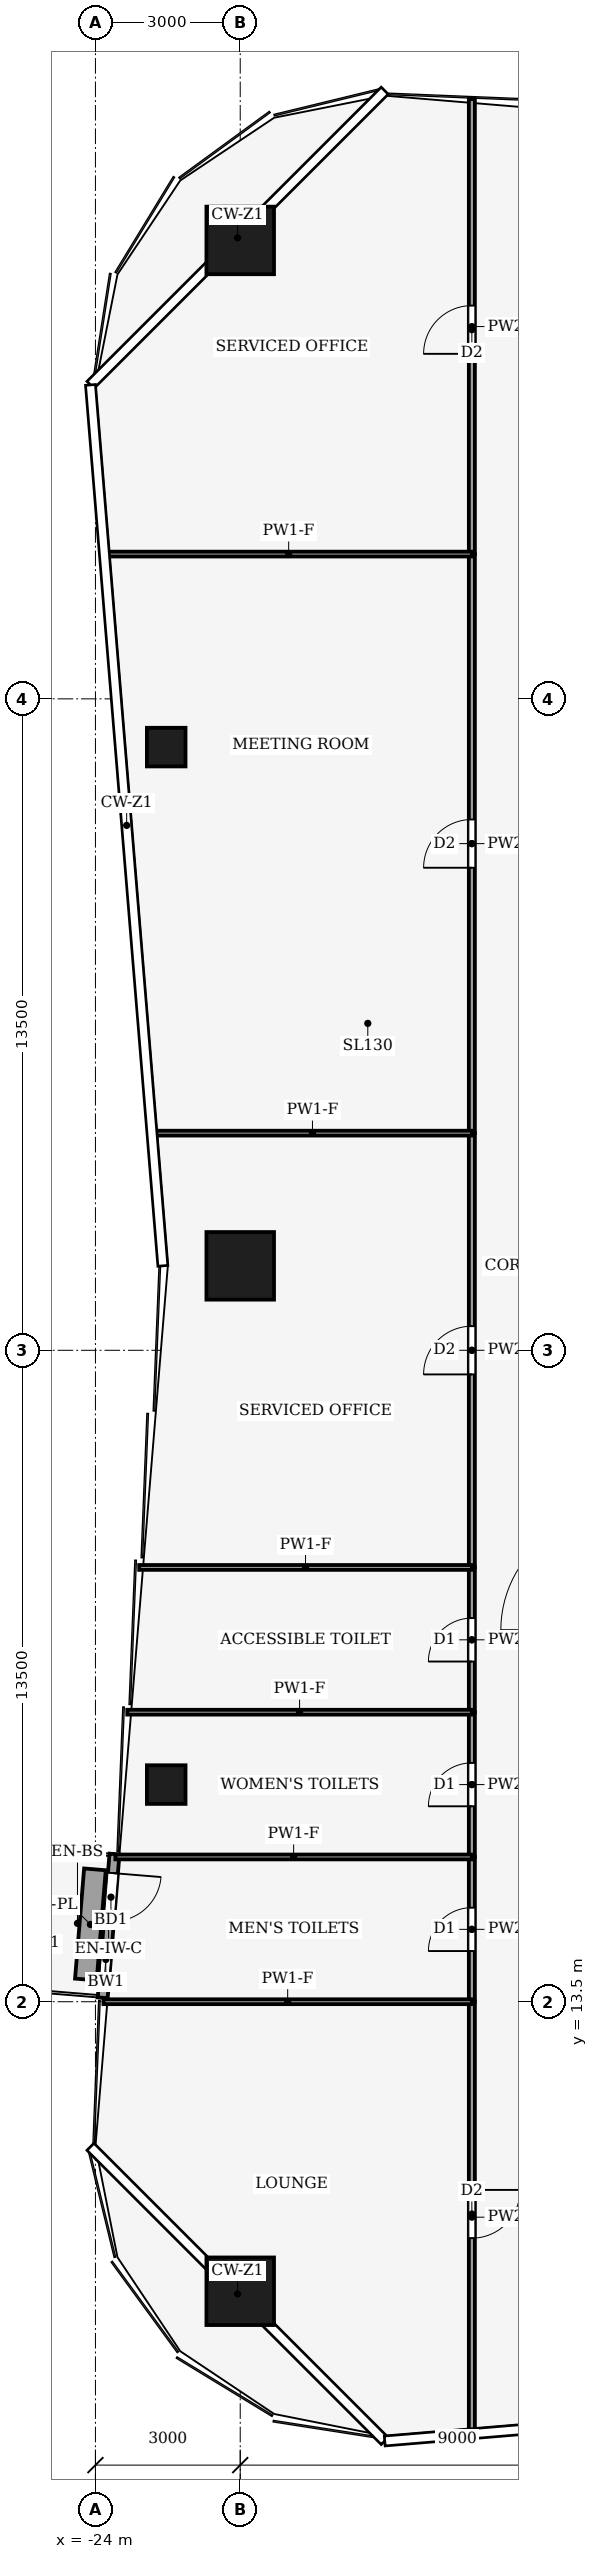
"""IFC4 building model, lengths in metres.
Left out: names, types, materials, properties, quantities, classifications, styles, units other than length and angle.
Written with IfcOpenShell. Run it as: python <this file> out.ifc"""

import sys

from ifc_helpers import new_model, si_unit, direction, frame, frame_2d, origin, origin_2d, place, context, subcontext, project, spatial, rectangle, hollow_rectangle, extrude, element, fill, save


model = new_model("IFC4")
c1 = context("Model", 3, precision=1e-05, world=origin(), true_north=direction((0.0, 1.0)))
c2 = subcontext(c1, "Body", "Model", "MODEL_VIEW")
j1 = project(units=[si_unit("LENGTHUNIT", "METRE"), si_unit("PLANEANGLEUNIT", "RADIAN")], contexts=[c1])
p1 = place(None, origin())
s1 = spatial("IfcSite", under=j1, at=p1, CompositionType="ELEMENT")
p2 = place(p1, origin())
s2 = spatial("IfcBuilding", under=s1, at=p2, CompositionType="ELEMENT")
p3 = place(p2, frame((0.0, 0.0, 102.0)))
s3 = spatial("IfcBuildingStorey", under=s2, at=p3, CompositionType="ELEMENT", Elevation=102.0)
for number, where, z_axis, x_axis in (
    (1, (-21.0, 50.0, 0.0), (0.0, 0.0, 1.0), (1.0, 0.0, 0.0)),
    (2, (-21.0, 7.5, 0.0), (0.0, 0.0, 1.0), (1.0, 0.0, 0.0)),
    (3, (-21.0, 28.75, 0.0), (0.0, 0.0, 1.0), (1.0, 0.0, 0.0)),
):
    element("IfcColumn", number, at=place(p3, frame(where, z_axis=z_axis, x_axis=x_axis)), inside=s3, PredefinedType="COLUMN", context=c2, shape_type="SweptSolid", body=[
        extrude(hollow_rectangle(XDim=1.4, YDim=1.4, WallThickness=0.08, at=origin_2d()), origin(), (0.0, 0.0, 1.0), 4.0),
    ])
for number, where, z_axis, x_axis in (
    (4, (-22.534, 18.0, 0.0), (0.0, 0.0, 1.0), (1.0, 0.0, 0.0)),
    (5, (-22.534, 39.5, 0.0), (0.0, 0.0, 1.0), (1.0, 0.0, 0.0)),
):
    element("IfcColumn", number, at=place(p3, frame(where, z_axis=z_axis, x_axis=x_axis)), inside=s3, PredefinedType="COLUMN", context=c2, shape_type="SweptSolid", body=[
        extrude(hollow_rectangle(XDim=0.8, YDim=0.8, WallThickness=0.04, at=origin_2d()), origin(), (0.0, 0.0, 1.0), 4.0),
    ])
p4 = place(p3, frame((-23.605, 16.561, 0.0), z_axis=(0.0, 0.0, 1.0), x_axis=(-0.081903334605, -0.996640278024, 0.0)))
e6 = element("IfcWall", 6, at=p4, inside=s3, PredefinedType="SOLIDWALL", context=c2, shape_type="SweptSolid", body=[
    extrude(rectangle(XDim=2.99, YDim=0.206, at=frame_2d((1.495, 0.0))), origin(), (0.0, 0.0, 1.0), 3.65),
])
p5 = place(p4, frame((0.396, 0.0, 0.0)))
e7 = element("IfcOpeningElement", 7, at=p5, cuts=e6, PredefinedType="OPENING", context=c2, shape_type="SweptSolid", body=[
    extrude(rectangle(XDim=1.0, YDim=2.1, at=frame_2d((0.5, 1.05))), frame((0.0, 0.113, 0.0), z_axis=(0.0, -1.0, 0.0), x_axis=(1.0, 0.0, 0.0)), (0.0, 0.0, 1.0), 0.226),
])
p6 = place(p4, frame((1.793, 0.0, 0.9)))
e8 = element("IfcOpeningElement", 8, at=p6, cuts=e6, PredefinedType="OPENING", context=c2, shape_type="SweptSolid", body=[
    extrude(rectangle(XDim=0.8, YDim=1.2, at=frame_2d((0.4, 0.6))), frame((0.0, 0.113, 0.0), z_axis=(0.0, -1.0, 0.0), x_axis=(1.0, 0.0, 0.0)), (0.0, 0.0, 1.0), 0.226),
])
p7 = place(p3, frame((-24.01, 16.243, 0.0), z_axis=(0.0, 0.0, 1.0), x_axis=(-0.081986639556, -0.996633428566, 0.0)))
e9 = element("IfcWall", 9, at=p7, inside=s3, PredefinedType="USERDEFINED", context=c2, shape_type="SweptSolid", body=[
    extrude(rectangle(XDim=2.29, YDim=0.45, at=frame_2d((1.145, 0.0))), origin(), (0.0, 0.0, 1.0), 0.4),
])
p8 = place(p3, frame((-16.2, 13.5, 0.0), z_axis=(0.0, 0.0, 1.0), x_axis=(0.0, -1.0, 0.0)))
e10 = element("IfcWall", 10, at=p8, inside=s3, PredefinedType="PARTITIONING", context=c2, shape_type="SweptSolid", body=[
    extrude(rectangle(XDim=8.93, YDim=0.125, at=frame_2d((4.465, 0.0))), origin(), (0.0, 0.0, 1.0), 3.04),
])
p9 = place(p8, frame((3.9, 0.0, 0.0)))
e11 = element("IfcOpeningElement", 11, at=p9, cuts=e10, PredefinedType="OPENING", context=c2, shape_type="SweptSolid", body=[
    extrude(rectangle(XDim=1.0, YDim=2.1, at=frame_2d((0.5, 1.05))), frame((0.0, 0.073, 0.0), z_axis=(0.0, -1.0, 0.0), x_axis=(1.0, 0.0, 0.0)), (0.0, 0.0, 1.0), 0.145),
])
p10 = place(p3, frame((-16.2, 13.5, 0.0), z_axis=(0.0, 0.0, 1.0), x_axis=(0.0, 1.0, 0.0)))
e12 = element("IfcWall", 12, at=p10, inside=s3, PredefinedType="PARTITIONING", context=c2, shape_type="SweptSolid", body=[
    extrude(rectangle(XDim=3.0, YDim=0.125, at=frame_2d((1.5, 0.0))), origin(), (0.0, 0.0, 1.0), 3.87),
])
p11 = place(p10, frame((1.05, 0.0, 0.0)))
e13 = element("IfcOpeningElement", 13, at=p11, cuts=e12, PredefinedType="OPENING", context=c2, shape_type="SweptSolid", body=[
    extrude(rectangle(XDim=0.9, YDim=2.1, at=frame_2d((0.45, 1.05))), frame((0.0, 0.073, 0.0), z_axis=(0.0, -1.0, 0.0), x_axis=(1.0, 0.0, 0.0)), (0.0, 0.0, 1.0), 0.145),
])
p12 = place(p3, frame((-16.2, 16.5, 0.0), z_axis=(0.0, 0.0, 1.0), x_axis=(0.0, 1.0, 0.0)))
e14 = element("IfcWall", 14, at=p12, inside=s3, PredefinedType="PARTITIONING", context=c2, shape_type="SweptSolid", body=[
    extrude(rectangle(XDim=3.0, YDim=0.125, at=frame_2d((1.5, 0.0))), origin(), (0.0, 0.0, 1.0), 3.14),
])
p13 = place(p12, frame((1.05, 0.0, 0.0)))
e15 = element("IfcOpeningElement", 15, at=p13, cuts=e14, PredefinedType="OPENING", context=c2, shape_type="SweptSolid", body=[
    extrude(rectangle(XDim=0.9, YDim=2.1, at=frame_2d((0.45, 1.05))), frame((0.0, 0.073, 0.0), z_axis=(0.0, -1.0, 0.0), x_axis=(1.0, 0.0, 0.0)), (0.0, 0.0, 1.0), 0.145),
])
p14 = place(p3, frame((-16.2, 19.5, 0.0), z_axis=(0.0, 0.0, 1.0), x_axis=(0.0, 1.0, 0.0)))
e16 = element("IfcWall", 16, at=p14, inside=s3, PredefinedType="PARTITIONING", context=c2, shape_type="SweptSolid", body=[
    extrude(rectangle(XDim=3.0, YDim=0.125, at=frame_2d((1.5, 0.0))), origin(), (0.0, 0.0, 1.0), 3.87),
])
p15 = place(p14, frame((1.05, 0.0, 0.0)))
e17 = element("IfcOpeningElement", 17, at=p15, cuts=e16, PredefinedType="OPENING", context=c2, shape_type="SweptSolid", body=[
    extrude(rectangle(XDim=0.9, YDim=2.1, at=frame_2d((0.45, 1.05))), frame((0.0, 0.073, 0.0), z_axis=(0.0, -1.0, 0.0), x_axis=(1.0, 0.0, 0.0)), (0.0, 0.0, 1.0), 0.145),
])
p16 = place(p3, frame((-16.2, 22.5, 0.0), z_axis=(0.0, 0.0, 1.0), x_axis=(0.0, 1.0, 0.0)))
e18 = element("IfcWall", 18, at=p16, inside=s3, PredefinedType="PARTITIONING", context=c2, shape_type="SweptSolid", body=[
    extrude(rectangle(XDim=9.0, YDim=0.125, at=frame_2d((4.5, 0.0))), origin(), (0.0, 0.0, 1.0), 3.48),
])
p17 = place(p16, frame((4.0, 0.0, 0.0)))
e19 = element("IfcOpeningElement", 19, at=p17, cuts=e18, PredefinedType="OPENING", context=c2, shape_type="SweptSolid", body=[
    extrude(rectangle(XDim=1.0, YDim=2.1, at=frame_2d((0.5, 1.05))), frame((0.0, 0.073, 0.0), z_axis=(0.0, -1.0, 0.0), x_axis=(1.0, 0.0, 0.0)), (0.0, 0.0, 1.0), 0.145),
])
p18 = place(p3, frame((-16.2, 31.5, 0.0), z_axis=(0.0, 0.0, 1.0), x_axis=(0.0, 1.0, 0.0)))
e20 = element("IfcWall", 20, at=p18, inside=s3, PredefinedType="PARTITIONING", context=c2, shape_type="SweptSolid", body=[
    extrude(rectangle(XDim=12.0, YDim=0.125, at=frame_2d((6.0, 0.0))), origin(), (0.0, 0.0, 1.0), 3.14),
])
p19 = place(p18, frame((5.5, 0.0, 0.0)))
e21 = element("IfcOpeningElement", 21, at=p19, cuts=e20, PredefinedType="OPENING", context=c2, shape_type="SweptSolid", body=[
    extrude(rectangle(XDim=1.0, YDim=2.1, at=frame_2d((0.5, 1.05))), frame((0.0, 0.073, 0.0), z_axis=(0.0, -1.0, 0.0), x_axis=(1.0, 0.0, 0.0)), (0.0, 0.0, 1.0), 0.145),
])
p20 = place(p3, frame((-16.2, 43.5, 0.0), z_axis=(0.0, 0.0, 1.0), x_axis=(0.0, 1.0, 0.0)))
e22 = element("IfcWall", 22, at=p20, inside=s3, PredefinedType="PARTITIONING", context=c2, shape_type="SweptSolid", body=[
    extrude(rectangle(XDim=9.43, YDim=0.125, at=frame_2d((4.715, 0.0))), origin(), (0.0, 0.0, 1.0), 3.04),
])
p21 = place(p20, frame((4.15, 0.0, 0.0)))
e23 = element("IfcOpeningElement", 23, at=p21, cuts=e22, PredefinedType="OPENING", context=c2, shape_type="SweptSolid", body=[
    extrude(rectangle(XDim=1.0, YDim=2.1, at=frame_2d((0.5, 1.05))), frame((0.0, 0.073, 0.0), z_axis=(0.0, -1.0, 0.0), x_axis=(1.0, 0.0, 0.0)), (0.0, 0.0, 1.0), 0.145),
])
p22 = place(p3, frame((-16.2, 13.5, 0.0), z_axis=(0.0, 0.0, 1.0), x_axis=(-1.0, 0.0, 0.0)))
e24 = element("IfcWall", 24, at=p22, inside=s3, PredefinedType="PARTITIONING", context=c2, shape_type="SweptSolid", body=[
    extrude(rectangle(XDim=7.634, YDim=0.1, at=frame_2d((3.817, 0.0))), origin(), (0.0, 0.0, 1.0), 3.04),
])
p23 = place(p3, frame((-16.2, 16.5, 0.0), z_axis=(0.0, 0.0, 1.0), x_axis=(-1.0, 0.0, 0.0)))
e25 = element("IfcWall", 25, at=p23, inside=s3, PredefinedType="PARTITIONING", context=c2, shape_type="SweptSolid", body=[
    extrude(rectangle(XDim=7.387, YDim=0.1, at=frame_2d((3.693, 0.0))), origin(), (0.0, 0.0, 1.0), 3.04),
])
p24 = place(p3, frame((-16.2, 19.5, 0.0), z_axis=(0.0, 0.0, 1.0), x_axis=(-1.0, 0.0, 0.0)))
e26 = element("IfcWall", 26, at=p24, inside=s3, PredefinedType="PARTITIONING", context=c2, shape_type="SweptSolid", body=[
    extrude(rectangle(XDim=7.14, YDim=0.1, at=frame_2d((3.57, 0.0))), origin(), (0.0, 0.0, 1.0), 3.04),
])
p25 = place(p3, frame((-16.2, 22.5, 0.0), z_axis=(0.0, 0.0, 1.0), x_axis=(-1.0, 0.0, 0.0)))
e27 = element("IfcWall", 27, at=p25, inside=s3, PredefinedType="PARTITIONING", context=c2, shape_type="SweptSolid", body=[
    extrude(rectangle(XDim=6.894, YDim=0.1, at=frame_2d((3.447, 0.0))), origin(), (0.0, 0.0, 1.0), 3.04),
])
p26 = place(p3, frame((-16.2, 31.5, 0.0), z_axis=(0.0, 0.0, 1.0), x_axis=(-1.0, 0.0, 0.0)))
e28 = element("IfcWall", 28, at=p26, inside=s3, PredefinedType="PARTITIONING", context=c2, shape_type="SweptSolid", body=[
    extrude(rectangle(XDim=6.606, YDim=0.1, at=frame_2d((3.303, 0.0))), origin(), (0.0, 0.0, 1.0), 3.04),
])
p27 = place(p3, frame((-16.2, 43.5, 0.0), z_axis=(0.0, 0.0, 1.0), x_axis=(-1.0, 0.0, 0.0)))
e29 = element("IfcWall", 29, at=p27, inside=s3, PredefinedType="PARTITIONING", context=c2, shape_type="SweptSolid", body=[
    extrude(rectangle(XDim=7.592, YDim=0.1, at=frame_2d((3.796, 0.0))), origin(), (0.0, 0.0, 1.0), 3.04),
])
p28 = place(p5, origin())
e30 = element("IfcDoor", 30, at=p28, inside=s3, OperationType="SINGLE_SWING_LEFT", PredefinedType="DOOR", context=c2, shape_type="SweptSolid", body=[
    extrude(rectangle(XDim=1.0, YDim=2.1, at=frame_2d((0.5, 1.05))), frame((0.0, 0.025, 0.0), z_axis=(0.0, -1.0, 0.0), x_axis=(1.0, 0.0, 0.0)), (0.0, 0.0, 1.0), 0.05),
])
fill(e7, e30)
p29 = place(p6, origin())
e31 = element("IfcWindow", 31, at=p29, inside=s3, PartitioningType="SINGLE_PANEL", PredefinedType="WINDOW", context=c2, shape_type="SweptSolid", body=[
    extrude(rectangle(XDim=0.8, YDim=1.2, at=frame_2d((0.4, 0.6))), frame((0.0, 0.03, 0.0), z_axis=(0.0, -1.0, 0.0), x_axis=(1.0, 0.0, 0.0)), (0.0, 0.0, 1.0), 0.06),
])
fill(e8, e31)
p30 = place(p9, origin())
e32 = element("IfcDoor", 32, at=p30, inside=s3, OperationType="SINGLE_SWING_LEFT", PredefinedType="DOOR", context=c2, shape_type="SweptSolid", body=[
    extrude(rectangle(XDim=1.0, YDim=2.1, at=frame_2d((0.5, 1.05))), frame((0.0, 0.025, 0.0), z_axis=(0.0, -1.0, 0.0), x_axis=(1.0, 0.0, 0.0)), (0.0, 0.0, 1.0), 0.05),
])
fill(e11, e32)
p31 = place(p11, origin())
e33 = element("IfcDoor", 33, at=p31, inside=s3, OperationType="SINGLE_SWING_RIGHT", PredefinedType="DOOR", context=c2, shape_type="SweptSolid", body=[
    extrude(rectangle(XDim=0.9, YDim=2.1, at=frame_2d((0.45, 1.05))), frame((0.0, 0.025, 0.0), z_axis=(0.0, -1.0, 0.0), x_axis=(1.0, 0.0, 0.0)), (0.0, 0.0, 1.0), 0.05),
])
fill(e13, e33)
p32 = place(p13, origin())
e34 = element("IfcDoor", 34, at=p32, inside=s3, OperationType="SINGLE_SWING_LEFT", PredefinedType="DOOR", context=c2, shape_type="SweptSolid", body=[
    extrude(rectangle(XDim=0.9, YDim=2.1, at=frame_2d((0.45, 1.05))), frame((0.0, 0.025, 0.0), z_axis=(0.0, -1.0, 0.0), x_axis=(1.0, 0.0, 0.0)), (0.0, 0.0, 1.0), 0.05),
])
fill(e15, e34)
p33 = place(p15, origin())
e35 = element("IfcDoor", 35, at=p33, inside=s3, OperationType="SINGLE_SWING_RIGHT", PredefinedType="DOOR", context=c2, shape_type="SweptSolid", body=[
    extrude(rectangle(XDim=0.9, YDim=2.1, at=frame_2d((0.45, 1.05))), frame((0.0, 0.025, 0.0), z_axis=(0.0, -1.0, 0.0), x_axis=(1.0, 0.0, 0.0)), (0.0, 0.0, 1.0), 0.05),
])
fill(e17, e35)
p34 = place(p17, origin())
e36 = element("IfcDoor", 36, at=p34, inside=s3, OperationType="SINGLE_SWING_LEFT", PredefinedType="DOOR", context=c2, shape_type="SweptSolid", body=[
    extrude(rectangle(XDim=1.0, YDim=2.1, at=frame_2d((0.5, 1.05))), frame((0.0, 0.025, 0.0), z_axis=(0.0, -1.0, 0.0), x_axis=(1.0, 0.0, 0.0)), (0.0, 0.0, 1.0), 0.05),
])
fill(e19, e36)
p35 = place(p19, origin())
e37 = element("IfcDoor", 37, at=p35, inside=s3, OperationType="SINGLE_SWING_RIGHT", PredefinedType="DOOR", context=c2, shape_type="SweptSolid", body=[
    extrude(rectangle(XDim=1.0, YDim=2.1, at=frame_2d((0.5, 1.05))), frame((0.0, 0.025, 0.0), z_axis=(0.0, -1.0, 0.0), x_axis=(1.0, 0.0, 0.0)), (0.0, 0.0, 1.0), 0.05),
])
fill(e21, e37)
p36 = place(p21, origin())
e38 = element("IfcDoor", 38, at=p36, inside=s3, OperationType="SINGLE_SWING_LEFT", PredefinedType="DOOR", context=c2, shape_type="SweptSolid", body=[
    extrude(rectangle(XDim=1.0, YDim=2.1, at=frame_2d((0.5, 1.05))), frame((0.0, 0.025, 0.0), z_axis=(0.0, -1.0, 0.0), x_axis=(1.0, 0.0, 0.0)), (0.0, 0.0, 1.0), 0.05),
])
fill(e23, e38)
save(model, sys.argv[1])
